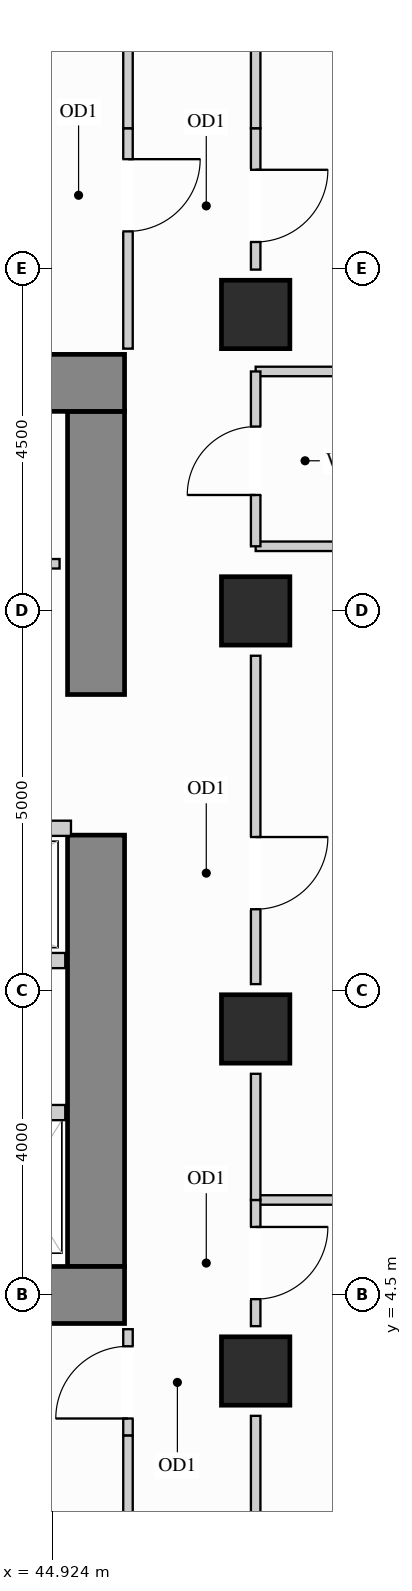
"""IFC4 building model, lengths in metres.
Left out: names, types, materials, properties, quantities, classifications, styles, units other than length and angle.
Written with IfcOpenShell. Run it as: python <this file> out.ifc"""

import sys

from ifc_helpers import new_model, si_unit, direction, frame, frame_2d, origin, origin_2d, place, context, subcontext, project, spatial, rectangle, extrude, source, transform, mapped, element, fill, save


model = new_model("IFC4")
c1 = context("Model", 3, precision=1e-05, world=origin(), true_north=direction((0.0, 1.0)))
c2 = subcontext(c1, "Body", "Model", "MODEL_VIEW")
j1 = project(units=[si_unit("LENGTHUNIT", "METRE"), si_unit("PLANEANGLEUNIT", "RADIAN")], contexts=[c1])
p1 = place(None, origin())
s1 = spatial("IfcSite", under=j1, at=p1, CompositionType="ELEMENT")
p2 = place(p1, origin())
s2 = spatial("IfcBuilding", under=s1, at=p2, CompositionType="ELEMENT")
p3 = place(p2, frame((0.0, 0.0, 88.2)))
s3 = spatial("IfcBuildingStorey", under=s2, at=p3, CompositionType="ELEMENT", Elevation=88.2)
m1 = source(origin(), c2, "Body", "SweptSolid", [
    extrude(rectangle(XDim=0.9, YDim=0.9, at=origin_2d()), origin(), (0.0, 0.0, 1.0), 3.38),
])
for number, where, z_axis, x_axis in (
    (1, (47.6, 13.5, 0.0), (0.0, 0.0, 1.0), (1.0, 0.0, 0.0)),
    (2, (47.6, 3.5, 0.0), (0.0, 0.0, 1.0), (1.0, 0.0, 0.0)),
    (3, (47.6, 8.0, 0.0), (0.0, 0.0, 1.0), (1.0, 0.0, 0.0)),
    (4, (47.6, 17.4, 0.0), (0.0, 0.0, 1.0), (1.0, 0.0, 0.0)),
):
    element("IfcColumn", number, at=place(p3, frame(where, z_axis=z_axis, x_axis=x_axis)), inside=s3, PredefinedType="COLUMN", context=c2, shape_type="MappedRepresentation", body=[
        mapped(m1, transform((0.0, 0.0, 0.0), x_axis=(1.0, 0.0, 0.0), y_axis=(0.0, 1.0, 0.0), z_axis=(0.0, 0.0, 1.0))),
    ])
m2 = source(origin(), c2, "Body", "SweptSolid", [
    extrude(rectangle(XDim=5.675, YDim=0.75, at=frame_2d((2.837, 0.0))), origin(), (0.0, 0.0, 1.0), 3.38),
])
p4 = place(p3, frame((45.5, 4.875, 0.0), z_axis=(0.0, 0.0, 1.0), x_axis=(0.0, 1.0, 0.0)))
e5 = element("IfcWall", 5, at=p4, inside=s3, PredefinedType="SHEAR", context=c2, shape_type="MappedRepresentation", body=[
    mapped(m2, transform((0.0, 0.0, 0.0), x_axis=(1.0, 0.0, 0.0), y_axis=(0.0, 1.0, 0.0), z_axis=(0.0, 0.0, 1.0))),
])
m3 = source(origin(), c2, "Body", "SweptSolid", [
    extrude(rectangle(XDim=3.725, YDim=0.75, at=frame_2d((1.863, 0.0))), origin(), (0.0, 0.0, 1.0), 3.38),
])
p5 = place(p3, frame((45.5, 12.4, 0.0), z_axis=(0.0, 0.0, 1.0), x_axis=(0.0, 1.0, 0.0)))
e6 = element("IfcWall", 6, at=p5, inside=s3, PredefinedType="SHEAR", context=c2, shape_type="MappedRepresentation", body=[
    mapped(m3, transform((0.0, 0.0, 0.0), x_axis=(1.0, 0.0, 0.0), y_axis=(0.0, 1.0, 0.0), z_axis=(0.0, 0.0, 1.0))),
])
m4 = source(origin(), c2, "Body", "SweptSolid", [
    extrude(rectangle(XDim=10.25, YDim=0.75, at=frame_2d((5.125, 0.0))), origin(), (0.0, 0.0, 1.0), 3.38),
])
for number, where, z_axis, x_axis in (
    (7, (35.625, 16.5, 0.0), (0.0, 0.0, 1.0), (1.0, 0.0, 0.0)),
    (8, (35.625, 4.5, 0.0), (0.0, 0.0, 1.0), (1.0, 0.0, 0.0)),
):
    element("IfcWall", number, at=place(p3, frame(where, z_axis=z_axis, x_axis=x_axis)), inside=s3, PredefinedType="SHEAR", context=c2, shape_type="MappedRepresentation", body=[
        mapped(m4, transform((0.0, 0.0, 0.0), x_axis=(1.0, 0.0, 0.0), y_axis=(0.0, 1.0, 0.0), z_axis=(0.0, 0.0, 1.0))),
    ])
p6 = place(p3, frame((41.8, 14.12, 0.0), z_axis=(0.0, 0.0, 1.0), x_axis=(1.0, 0.0, 0.0)))
e9 = element("IfcWall", 9, at=p6, inside=s3, PredefinedType="PARTITIONING", context=c2, shape_type="SweptSolid", body=[
    extrude(rectangle(XDim=3.22, YDim=0.125, at=frame_2d((1.61, 0.0))), origin(), (0.0, 0.0, 1.0), 3.365),
])
p7 = place(p6, frame((1.135, 0.0, 0.0)))
e10 = element("IfcOpeningElement", 10, at=p7, cuts=e9, PredefinedType="OPENING", context=c2, shape_type="SweptSolid", body=[
    extrude(rectangle(XDim=0.85, YDim=2.1, at=frame_2d((0.425, 1.05))), frame((0.0, 0.073, 0.0), z_axis=(0.0, -1.0, 0.0), x_axis=(1.0, 0.0, 0.0)), (0.0, 0.0, 1.0), 0.145),
])
m5 = source(origin(), c2, "Body", "SweptSolid", [
    extrude(rectangle(XDim=8.048, YDim=0.125, at=frame_2d((4.024, 0.0))), origin(), (0.0, 0.0, 1.0), 3.365),
])
p8 = place(p3, frame((47.6, 14.35, 0.0), z_axis=(0.0, 0.0, 1.0), x_axis=(1.0, 0.0, 0.0)))
e11 = element("IfcWall", 11, at=p8, inside=s3, PredefinedType="PARTITIONING", context=c2, shape_type="MappedRepresentation", body=[
    mapped(m5, transform((0.0, 0.0, 0.0), x_axis=(1.0, 0.0, 0.0), y_axis=(0.0, 1.0, 0.0), z_axis=(0.0, 0.0, 1.0))),
])
m6 = source(origin(), c2, "Body", "SweptSolid", [
    extrude(rectangle(XDim=8.048, YDim=0.125, at=frame_2d((4.024, 0.0))), origin(), (0.0, 0.0, 1.0), 2.677),
])
p9 = place(p3, frame((47.6, 16.65, 0.0), z_axis=(0.0, 0.0, 1.0), x_axis=(1.0, 0.0, 0.0)))
e12 = element("IfcWall", 12, at=p9, inside=s3, PredefinedType="PARTITIONING", context=c2, shape_type="MappedRepresentation", body=[
    mapped(m6, transform((0.0, 0.0, 0.0), x_axis=(1.0, 0.0, 0.0), y_axis=(0.0, 1.0, 0.0), z_axis=(0.0, 0.0, 1.0))),
])
p10 = place(p3, frame((47.6, 5.75, 0.0), z_axis=(0.0, 0.0, 1.0), x_axis=(1.0, 0.0, 0.0)))
e13 = element("IfcWall", 13, at=p10, inside=s3, PredefinedType="PARTITIONING", context=c2, shape_type="MappedRepresentation", body=[
    mapped(m5, transform((0.0, 0.0, 0.0), x_axis=(1.0, 0.0, 0.0), y_axis=(0.0, 1.0, 0.0), z_axis=(0.0, 0.0, 1.0))),
])
p11 = place(p3, frame((47.6, 4.09, 0.0), z_axis=(0.0, 0.0, 1.0), x_axis=(0.0, 1.0, 0.0)))
e14 = element("IfcWall", 14, at=p11, inside=s3, PredefinedType="PARTITIONING", context=c2, shape_type="SweptSolid", body=[
    extrude(rectangle(XDim=1.66, YDim=0.125, at=frame_2d((0.83, 0.0))), origin(), (0.0, 0.0, 1.0), 2.677),
])
p12 = place(p11, frame((0.355, 0.0, 0.0)))
e15 = element("IfcOpeningElement", 15, at=p12, cuts=e14, PredefinedType="OPENING", context=c2, shape_type="SweptSolid", body=[
    extrude(rectangle(XDim=0.95, YDim=2.15, at=frame_2d((0.475, 1.075))), frame((0.0, 0.073, 0.0), z_axis=(0.0, -1.0, 0.0), x_axis=(1.0, 0.0, 0.0)), (0.0, 0.0, 1.0), 0.145),
])
m7 = source(origin(), c2, "Body", "SweptSolid", [
    extrude(rectangle(XDim=1.72, YDim=0.125, at=frame_2d((0.86, 0.0))), origin(), (0.0, 0.0, 1.0), 2.677),
])
p13 = place(p3, frame((47.6, 1.19, 0.0), z_axis=(0.0, 0.0, 1.0), x_axis=(0.0, 1.0, 0.0)))
e16 = element("IfcWall", 16, at=p13, inside=s3, PredefinedType="PARTITIONING", context=c2, shape_type="MappedRepresentation", body=[
    mapped(m7, transform((0.0, 0.0, 0.0), x_axis=(1.0, 0.0, 0.0), y_axis=(0.0, 1.0, 0.0), z_axis=(0.0, 0.0, 1.0))),
])
m8 = source(origin(), c2, "Body", "SweptSolid", [
    extrude(rectangle(XDim=1.66, YDim=0.125, at=frame_2d((0.83, 0.0))), origin(), (0.0, 0.0, 1.0), 2.677),
])
p14 = place(p3, frame((47.6, 5.75, 0.0), z_axis=(0.0, 0.0, 1.0), x_axis=(0.0, 1.0, 0.0)))
e17 = element("IfcWall", 17, at=p14, inside=s3, PredefinedType="PARTITIONING", context=c2, shape_type="MappedRepresentation", body=[
    mapped(m8, transform((0.0, 0.0, 0.0), x_axis=(1.0, 0.0, 0.0), y_axis=(0.0, 1.0, 0.0), z_axis=(0.0, 0.0, 1.0))),
])
p15 = place(p3, frame((47.6, 8.59, 0.0), z_axis=(0.0, 0.0, 1.0), x_axis=(0.0, 1.0, 0.0)))
e18 = element("IfcWall", 18, at=p15, inside=s3, PredefinedType="PARTITIONING", context=c2, shape_type="SweptSolid", body=[
    extrude(rectangle(XDim=4.32, YDim=0.125, at=frame_2d((2.16, 0.0))), origin(), (0.0, 0.0, 1.0), 2.677),
])
p16 = place(p15, frame((0.985, 0.0, 0.0)))
e19 = element("IfcOpeningElement", 19, at=p16, cuts=e18, PredefinedType="OPENING", context=c2, shape_type="SweptSolid", body=[
    extrude(rectangle(XDim=0.95, YDim=2.15, at=frame_2d((0.475, 1.075))), frame((0.0, 0.073, 0.0), z_axis=(0.0, -1.0, 0.0), x_axis=(1.0, 0.0, 0.0)), (0.0, 0.0, 1.0), 0.145),
])
p17 = place(p3, frame((47.6, 17.99, 0.0), z_axis=(0.0, 0.0, 1.0), x_axis=(0.0, 1.0, 0.0)))
e20 = element("IfcWall", 20, at=p17, inside=s3, PredefinedType="PARTITIONING", context=c2, shape_type="SweptSolid", body=[
    extrude(rectangle(XDim=1.86, YDim=0.125, at=frame_2d((0.93, 0.0))), origin(), (0.0, 0.0, 1.0), 2.677),
])
p18 = place(p17, frame((0.363, 0.0, 0.0)))
e21 = element("IfcOpeningElement", 21, at=p18, cuts=e20, PredefinedType="OPENING", context=c2, shape_type="SweptSolid", body=[
    extrude(rectangle(XDim=0.95, YDim=2.15, at=frame_2d((0.475, 1.075))), frame((0.0, 0.073, 0.0), z_axis=(0.0, -1.0, 0.0), x_axis=(1.0, 0.0, 0.0)), (0.0, 0.0, 1.0), 0.145),
])
m9 = source(origin(), c2, "Body", "SweptSolid", [
    extrude(rectangle(XDim=1.46, YDim=0.125, at=frame_2d((0.73, 0.0))), origin(), (0.0, 0.0, 1.0), 2.677),
])
p19 = place(p3, frame((47.6, 19.85, 0.0), z_axis=(0.0, 0.0, 1.0), x_axis=(0.0, 1.0, 0.0)))
e22 = element("IfcWall", 22, at=p19, inside=s3, PredefinedType="PARTITIONING", context=c2, shape_type="MappedRepresentation", body=[
    mapped(m9, transform((0.0, 0.0, 0.0), x_axis=(1.0, 0.0, 0.0), y_axis=(0.0, 1.0, 0.0), z_axis=(0.0, 0.0, 1.0))),
])
p20 = place(p3, frame((47.6, 14.35, 0.0), z_axis=(0.0, 0.0, 1.0), x_axis=(0.0, 1.0, 0.0)))
e23 = element("IfcWall", 23, at=p20, inside=s3, PredefinedType="PARTITIONING", context=c2, shape_type="SweptSolid", body=[
    extrude(rectangle(XDim=2.3, YDim=0.125, at=frame_2d((1.15, 0.0))), origin(), (0.0, 0.0, 1.0), 2.677),
])
p21 = place(p20, frame((0.675, 0.0, 0.0)))
e24 = element("IfcOpeningElement", 24, at=p21, cuts=e23, PredefinedType="OPENING", context=c2, shape_type="SweptSolid", body=[
    extrude(rectangle(XDim=0.9, YDim=2.15, at=frame_2d((0.45, 1.075))), frame((0.0, 0.073, 0.0), z_axis=(0.0, -1.0, 0.0), x_axis=(1.0, 0.0, 0.0)), (0.0, 0.0, 1.0), 0.145),
])
p22 = place(p3, frame((45.92, 16.95, 0.0), z_axis=(0.0, 0.0, 1.0), x_axis=(0.0, 1.0, 0.0)))
e25 = element("IfcWall", 25, at=p22, inside=s3, PredefinedType="PARTITIONING", context=c2, shape_type="SweptSolid", body=[
    extrude(rectangle(XDim=2.9, YDim=0.125, at=frame_2d((1.45, 0.0))), origin(), (0.0, 0.0, 1.0), 3.365),
])
p23 = place(p22, frame((1.543, 0.0, 0.0)))
e26 = element("IfcOpeningElement", 26, at=p23, cuts=e25, PredefinedType="OPENING", context=c2, shape_type="SweptSolid", body=[
    extrude(rectangle(XDim=0.95, YDim=2.15, at=frame_2d((0.475, 1.075))), frame((0.0, 0.073, 0.0), z_axis=(0.0, -1.0, 0.0), x_axis=(1.0, 0.0, 0.0)), (0.0, 0.0, 1.0), 0.145),
])
m10 = source(origin(), c2, "Body", "SweptSolid", [
    extrude(rectangle(XDim=2.298, YDim=0.125, at=frame_2d((1.149, 0.0))), origin(), (0.0, 0.0, 1.0), 3.365),
])
p24 = place(p3, frame((45.92, 19.85, 0.0), z_axis=(0.0, 0.0, 1.0), x_axis=(0.0, 1.0, 0.0)))
e27 = element("IfcWall", 27, at=p24, inside=s3, PredefinedType="PARTITIONING", context=c2, shape_type="MappedRepresentation", body=[
    mapped(m10, transform((0.0, 0.0, 0.0), x_axis=(1.0, 0.0, 0.0), y_axis=(0.0, 1.0, 0.0), z_axis=(0.0, 0.0, 1.0))),
])
p25 = place(p3, frame((45.92, 2.65, 0.0), z_axis=(0.0, 0.0, 1.0), x_axis=(0.0, 1.0, 0.0)))
e28 = element("IfcWall", 28, at=p25, inside=s3, PredefinedType="PARTITIONING", context=c2, shape_type="SweptSolid", body=[
    extrude(rectangle(XDim=1.4, YDim=0.125, at=frame_2d((0.7, 0.0))), origin(), (0.0, 0.0, 1.0), 3.365),
])
p26 = place(p25, frame((0.225, 0.0, 0.0)))
e29 = element("IfcOpeningElement", 29, at=p26, cuts=e28, PredefinedType="OPENING", context=c2, shape_type="SweptSolid", body=[
    extrude(rectangle(XDim=0.95, YDim=2.15, at=frame_2d((0.475, 1.075))), frame((0.0, 0.073, 0.0), z_axis=(0.0, -1.0, 0.0), x_axis=(1.0, 0.0, 0.0)), (0.0, 0.0, 1.0), 0.145),
])
p27 = place(p3, frame((45.92, 0.352, 0.0), z_axis=(0.0, 0.0, 1.0), x_axis=(0.0, 1.0, 0.0)))
e30 = element("IfcWall", 30, at=p27, inside=s3, PredefinedType="PARTITIONING", context=c2, shape_type="MappedRepresentation", body=[
    mapped(m10, transform((0.0, 0.0, 0.0), x_axis=(1.0, 0.0, 0.0), y_axis=(0.0, 1.0, 0.0), z_axis=(0.0, 0.0, 1.0))),
])
m11 = source(origin(), c2, "Body", "SweptSolid", [
    extrude(rectangle(XDim=1.245, YDim=0.2, at=frame_2d((0.623, 0.0))), origin(), (0.0, 0.0, 1.0), 3.365),
])
p28 = place(p3, frame((43.85, 6.9, 0.0), z_axis=(0.0, 0.0, 1.0), x_axis=(1.0, 0.0, 0.0)))
e31 = element("IfcWall", 31, at=p28, inside=s3, PredefinedType="PARTITIONING", context=c2, shape_type="MappedRepresentation", body=[
    mapped(m11, transform((0.0, 0.0, 0.0), x_axis=(1.0, 0.0, 0.0), y_axis=(0.0, 1.0, 0.0), z_axis=(0.0, 0.0, 1.0))),
])
m12 = source(origin(), c2, "Body", "SweptSolid", [
    extrude(rectangle(XDim=3.49, YDim=0.2, at=frame_2d((1.745, 0.0))), origin(), (0.0, 0.0, 1.0), 3.365),
])
p29 = place(p3, frame((41.68, 10.64, 0.0), z_axis=(0.0, 0.0, 1.0), x_axis=(1.0, 0.0, 0.0)))
e32 = element("IfcWall", 32, at=p29, inside=s3, PredefinedType="PARTITIONING", context=c2, shape_type="MappedRepresentation", body=[
    mapped(m12, transform((0.0, 0.0, 0.0), x_axis=(1.0, 0.0, 0.0), y_axis=(0.0, 1.0, 0.0), z_axis=(0.0, 0.0, 1.0))),
])
m13 = source(origin(), c2, "Body", "SweptSolid", [
    extrude(rectangle(XDim=3.415, YDim=0.2, at=frame_2d((1.708, 0.0))), origin(), (0.0, 0.0, 1.0), 3.365),
])
p30 = place(p3, frame((41.68, 8.9, 0.0), z_axis=(0.0, 0.0, 1.0), x_axis=(1.0, 0.0, 0.0)))
e33 = element("IfcWall", 33, at=p30, inside=s3, PredefinedType="PARTITIONING", context=c2, shape_type="MappedRepresentation", body=[
    mapped(m13, transform((0.0, 0.0, 0.0), x_axis=(1.0, 0.0, 0.0), y_axis=(0.0, 1.0, 0.0), z_axis=(0.0, 0.0, 1.0))),
])
m14 = source(origin(), c2, "Body", "SweptSolid", [
    extrude(rectangle(XDim=0.95, YDim=2.15, at=frame_2d((0.475, 1.075))), frame((0.0, 0.025, 0.0), z_axis=(0.0, -1.0, 0.0), x_axis=(1.0, 0.0, 0.0)), (0.0, 0.0, 1.0), 0.05),
])
p31 = place(p23, origin())
e34 = element("IfcDoor", 34, at=p31, inside=s3, OperationType="SINGLE_SWING_RIGHT", PredefinedType="DOOR", context=c2, shape_type="MappedRepresentation", body=[
    mapped(m14, transform((0.0, 0.0, 0.0), x_axis=(1.0, 0.0, 0.0), y_axis=(0.0, 1.0, 0.0), z_axis=(0.0, 0.0, 1.0))),
])
fill(e26, e34)
p32 = place(p26, origin())
e35 = element("IfcDoor", 35, at=p32, inside=s3, OperationType="SINGLE_SWING_LEFT", PredefinedType="DOOR", context=c2, shape_type="MappedRepresentation", body=[
    mapped(m14, transform((0.0, 0.0, 0.0), x_axis=(1.0, 0.0, 0.0), y_axis=(0.0, 1.0, 0.0), z_axis=(0.0, 0.0, 1.0))),
])
fill(e29, e35)
p33 = place(p12, origin())
e36 = element("IfcDoor", 36, at=p33, inside=s3, OperationType="SINGLE_SWING_RIGHT", PredefinedType="DOOR", context=c2, shape_type="MappedRepresentation", body=[
    mapped(m14, transform((0.0, 0.0, 0.0), x_axis=(1.0, 0.0, 0.0), y_axis=(0.0, 1.0, 0.0), z_axis=(0.0, 0.0, 1.0))),
])
fill(e15, e36)
p34 = place(p16, origin())
e37 = element("IfcDoor", 37, at=p34, inside=s3, OperationType="SINGLE_SWING_RIGHT", PredefinedType="DOOR", context=c2, shape_type="MappedRepresentation", body=[
    mapped(m14, transform((0.0, 0.0, 0.0), x_axis=(1.0, 0.0, 0.0), y_axis=(0.0, 1.0, 0.0), z_axis=(0.0, 0.0, 1.0))),
])
fill(e19, e37)
p35 = place(p18, origin())
e38 = element("IfcDoor", 38, at=p35, inside=s3, OperationType="SINGLE_SWING_RIGHT", PredefinedType="DOOR", context=c2, shape_type="MappedRepresentation", body=[
    mapped(m14, transform((0.0, 0.0, 0.0), x_axis=(1.0, 0.0, 0.0), y_axis=(0.0, 1.0, 0.0), z_axis=(0.0, 0.0, 1.0))),
])
fill(e21, e38)
m15 = source(origin(), c2, "Body", "SweptSolid", [
    extrude(rectangle(XDim=0.9, YDim=2.15, at=frame_2d((0.45, 1.075))), frame((0.0, 0.025, 0.0), z_axis=(0.0, -1.0, 0.0), x_axis=(1.0, 0.0, 0.0)), (0.0, 0.0, 1.0), 0.05),
])
p36 = place(p21, origin())
e39 = element("IfcDoor", 39, at=p36, inside=s3, OperationType="SINGLE_SWING_LEFT", PredefinedType="DOOR", context=c2, shape_type="MappedRepresentation", body=[
    mapped(m15, transform((0.0, 0.0, 0.0), x_axis=(1.0, 0.0, 0.0), y_axis=(0.0, 1.0, 0.0), z_axis=(0.0, 0.0, 1.0))),
])
fill(e24, e39)
save(model, sys.argv[1])
